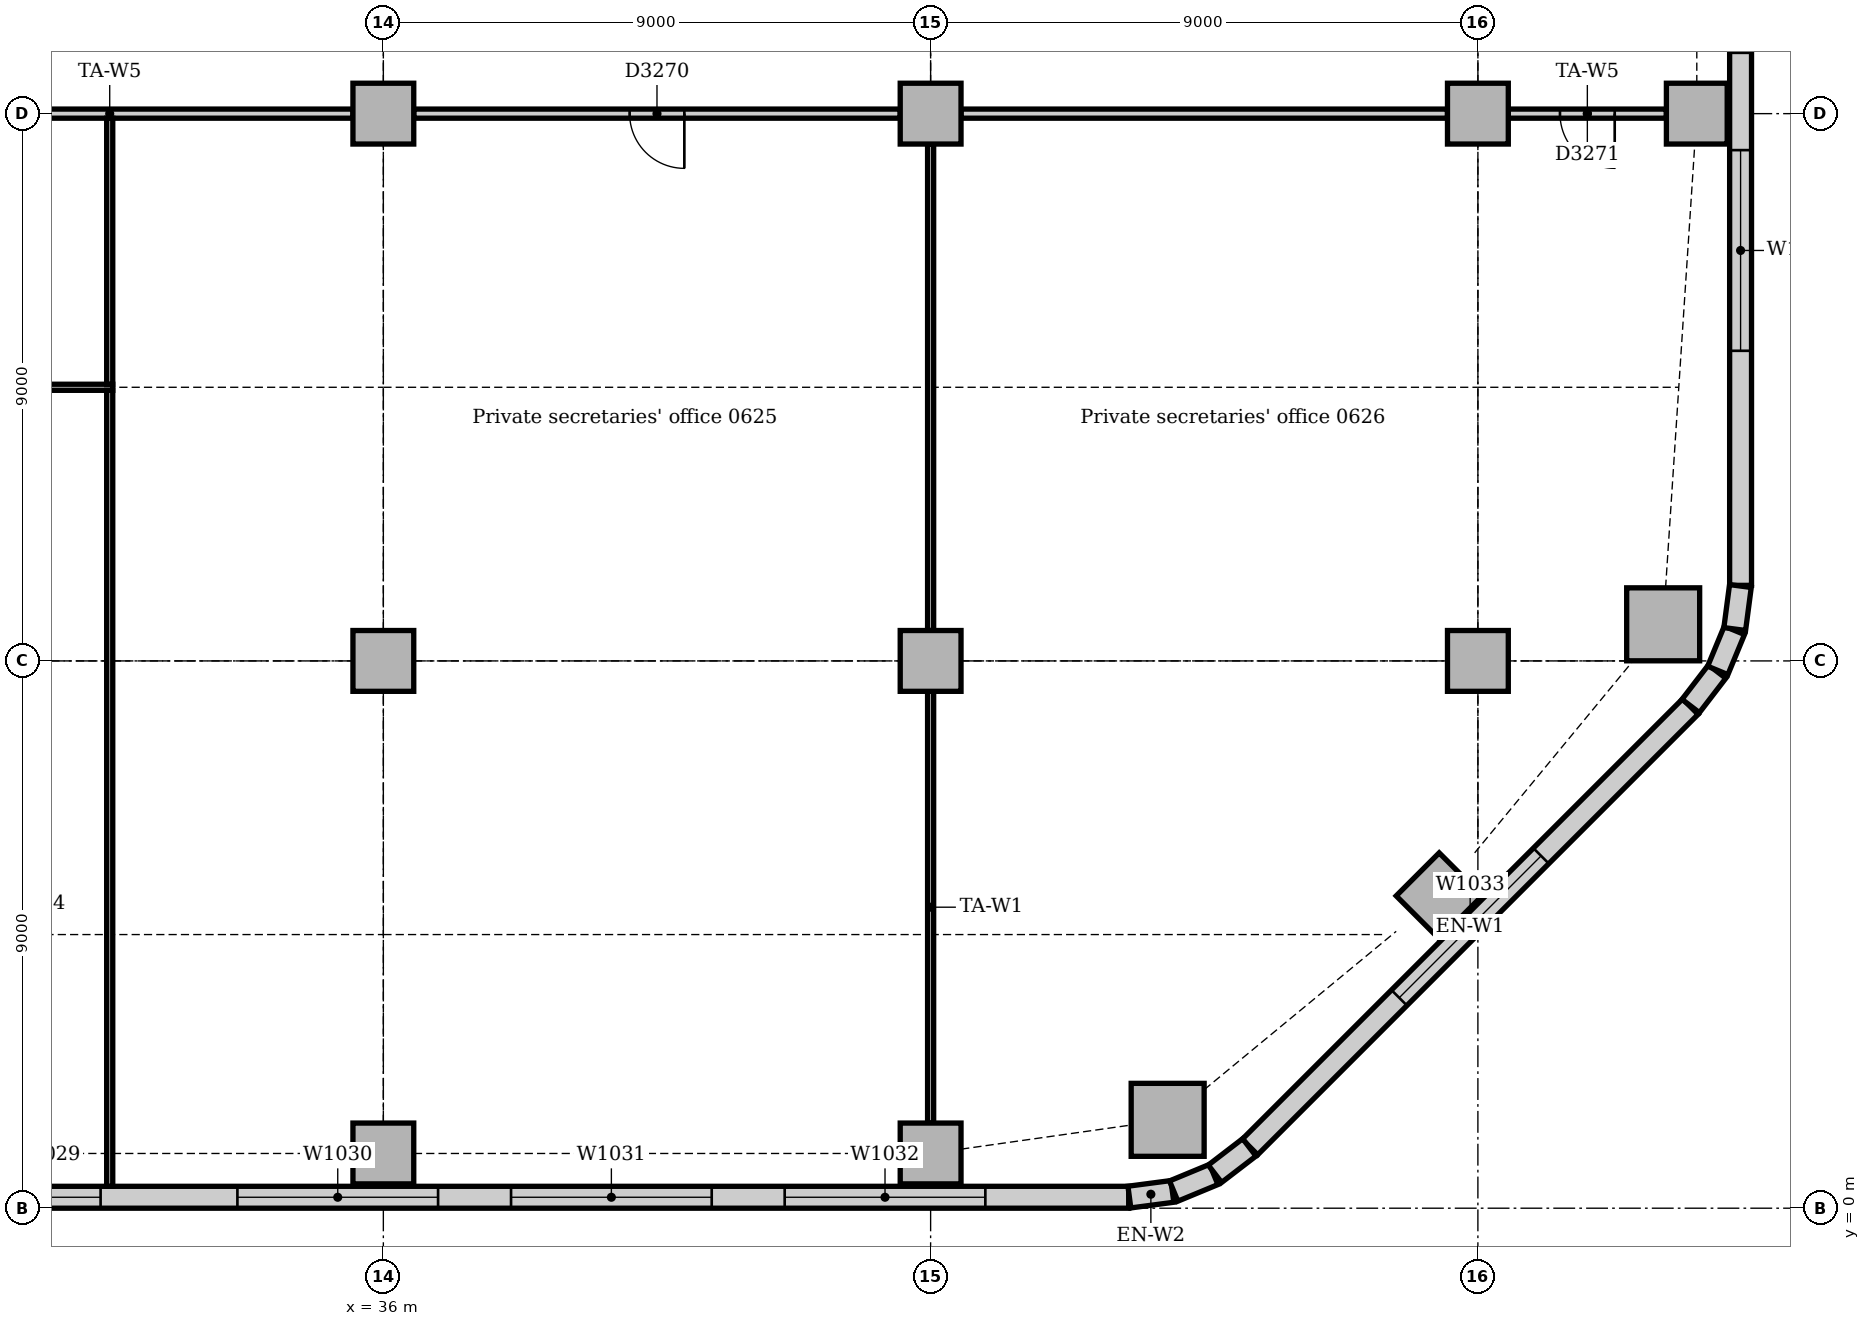
"""IFC4 building model, lengths in metres.
Left out: names, types, materials, properties, quantities, classifications, styles, units other than length and angle.
Written with IfcOpenShell. Run it as: python <this file> out.ifc"""

import sys

from ifc_helpers import new_model, si_unit, direction, frame, frame_2d, origin, origin_2d, place, context, subcontext, project, spatial, rectangle, extrude, element, fill, save


model = new_model("IFC4")
c1 = context("Model", 3, precision=1e-05, world=origin(), true_north=direction((0.0, 1.0)))
c2 = subcontext(c1, "Body", "Model", "MODEL_VIEW")
j1 = project(units=[si_unit("LENGTHUNIT", "METRE"), si_unit("PLANEANGLEUNIT", "RADIAN")], contexts=[c1])
p1 = place(None, origin())
s1 = spatial("IfcSite", under=j1, at=p1, CompositionType="ELEMENT")
p2 = place(p1, origin())
s2 = spatial("IfcBuilding", under=s1, at=p2, CompositionType="ELEMENT")
p3 = place(p2, frame((0.0, 0.0, 30.0)))
s3 = spatial("IfcBuildingStorey", under=s2, at=p3, CompositionType="ELEMENT", Elevation=30.0)
for number, where, z_axis, x_axis in (
    (1, (48.898, 1.453, 0.0), (0.0, 0.0, 1.0), (1.0, 0.0, 0.0)),
    (2, (57.047, 9.602, 0.0), (0.0, 0.0, 1.0), (1.0, 0.0, 0.0)),
):
    element("IfcColumn", number, at=place(p3, frame(where, z_axis=z_axis, x_axis=x_axis)), inside=s3, PredefinedType="COLUMN", context=c2, shape_type="SweptSolid", body=[
        extrude(rectangle(XDim=1.2, YDim=1.2, at=origin_2d()), origin(), (0.0, 0.0, 1.0), 3.85),
    ])
for number, where, z_axis, x_axis in (
    (3, (36.0, 0.9, 0.0), (0.0, 0.0, 1.0), (1.0, 0.0, 0.0)),
    (4, (45.0, 0.9, 0.0), (0.0, 0.0, 1.0), (1.0, 0.0, 0.0)),
    (5, (53.364, 5.136, 0.0), (0.0, 0.0, 1.0), (0.707, 0.707, 0.0)),
    (6, (57.6, 18.0, 0.0), (0.0, 0.0, 1.0), (1.0, 0.0, 0.0)),
    (7, (36.0, 9.0, 0.0), (0.0, 0.0, 1.0), (1.0, 0.0, 0.0)),
    (8, (36.0, 18.0, 0.0), (0.0, 0.0, 1.0), (1.0, 0.0, 0.0)),
    (9, (45.0, 9.0, 0.0), (0.0, 0.0, 1.0), (1.0, 0.0, 0.0)),
    (10, (45.0, 18.0, 0.0), (0.0, 0.0, 1.0), (1.0, 0.0, 0.0)),
    (11, (54.0, 9.0, 0.0), (0.0, 0.0, 1.0), (1.0, 0.0, 0.0)),
    (12, (54.0, 18.0, 0.0), (0.0, 0.0, 1.0), (1.0, 0.0, 0.0)),
):
    element("IfcColumn", number, at=place(p3, frame(where, z_axis=z_axis, x_axis=x_axis)), inside=s3, PredefinedType="COLUMN", context=c2, shape_type="SweptSolid", body=[
        extrude(rectangle(XDim=1.0, YDim=1.0, at=origin_2d()), origin(), (0.0, 0.0, 1.0), 3.85),
    ])
p4 = place(p3, frame((4.243, 0.18, 0.0), z_axis=(0.0, 0.0, 1.0), x_axis=(1.0, 0.0, 0.0)))
e13 = element("IfcWall", 13, at=p4, inside=s3, PredefinedType="STANDARD", context=c2, shape_type="SweptSolid", body=[
    extrude(rectangle(XDim=44.015, YDim=0.36, at=frame_2d((22.007, 0.0))), origin(), (0.0, 0.0, 1.0), 3.85),
])
p5 = place(p4, frame((2.707, 0.0, 0.9)))
e14 = element("IfcOpeningElement", 14, at=p5, cuts=e13, PredefinedType="OPENING", context=c2, shape_type="SweptSolid", body=[
    extrude(rectangle(XDim=3.3, YDim=1.6, at=frame_2d((1.65, 0.8))), frame((0.0, 0.19, 0.0), z_axis=(0.0, -1.0, 0.0), x_axis=(1.0, 0.0, 0.0)), (0.0, 0.0, 1.0), 0.38),
])
p6 = place(p4, frame((7.257, 0.0, 0.9)))
e15 = element("IfcOpeningElement", 15, at=p6, cuts=e13, PredefinedType="OPENING", context=c2, shape_type="SweptSolid", body=[
    extrude(rectangle(XDim=1.8, YDim=1.6, at=frame_2d((0.9, 0.8))), frame((0.0, 0.19, 0.0), z_axis=(0.0, -1.0, 0.0), x_axis=(1.0, 0.0, 0.0)), (0.0, 0.0, 1.0), 0.38),
])
p7 = place(p4, frame((11.357, 0.0, 0.9)))
e16 = element("IfcOpeningElement", 16, at=p7, cuts=e13, PredefinedType="OPENING", context=c2, shape_type="SweptSolid", body=[
    extrude(rectangle(XDim=3.3, YDim=1.6, at=frame_2d((1.65, 0.8))), frame((0.0, 0.19, 0.0), z_axis=(0.0, -1.0, 0.0), x_axis=(1.0, 0.0, 0.0)), (0.0, 0.0, 1.0), 0.38),
])
p8 = place(p4, frame((16.307, 0.0, 0.9)))
e17 = element("IfcOpeningElement", 17, at=p8, cuts=e13, PredefinedType="OPENING", context=c2, shape_type="SweptSolid", body=[
    extrude(rectangle(XDim=1.8, YDim=1.6, at=frame_2d((0.9, 0.8))), frame((0.0, 0.19, 0.0), z_axis=(0.0, -1.0, 0.0), x_axis=(1.0, 0.0, 0.0)), (0.0, 0.0, 1.0), 0.38),
])
p9 = place(p4, frame((20.357, 0.0, 0.9)))
e18 = element("IfcOpeningElement", 18, at=p9, cuts=e13, PredefinedType="OPENING", context=c2, shape_type="SweptSolid", body=[
    extrude(rectangle(XDim=3.3, YDim=1.6, at=frame_2d((1.65, 0.8))), frame((0.0, 0.19, 0.0), z_axis=(0.0, -1.0, 0.0), x_axis=(1.0, 0.0, 0.0)), (0.0, 0.0, 1.0), 0.38),
])
p10 = place(p4, frame((25.307, 0.0, 0.9)))
e19 = element("IfcOpeningElement", 19, at=p10, cuts=e13, PredefinedType="OPENING", context=c2, shape_type="SweptSolid", body=[
    extrude(rectangle(XDim=1.8, YDim=1.6, at=frame_2d((0.9, 0.8))), frame((0.0, 0.19, 0.0), z_axis=(0.0, -1.0, 0.0), x_axis=(1.0, 0.0, 0.0)), (0.0, 0.0, 1.0), 0.38),
])
p11 = place(p4, frame((29.357, 0.0, 0.9)))
e20 = element("IfcOpeningElement", 20, at=p11, cuts=e13, PredefinedType="OPENING", context=c2, shape_type="SweptSolid", body=[
    extrude(rectangle(XDim=3.3, YDim=1.6, at=frame_2d((1.65, 0.8))), frame((0.0, 0.19, 0.0), z_axis=(0.0, -1.0, 0.0), x_axis=(1.0, 0.0, 0.0)), (0.0, 0.0, 1.0), 0.38),
])
p12 = place(p4, frame((33.857, 0.0, 0.9)))
e21 = element("IfcOpeningElement", 21, at=p12, cuts=e13, PredefinedType="OPENING", context=c2, shape_type="SweptSolid", body=[
    extrude(rectangle(XDim=3.3, YDim=1.6, at=frame_2d((1.65, 0.8))), frame((0.0, 0.19, 0.0), z_axis=(0.0, -1.0, 0.0), x_axis=(1.0, 0.0, 0.0)), (0.0, 0.0, 1.0), 0.38),
])
p13 = place(p4, frame((38.357, 0.0, 0.9)))
e22 = element("IfcOpeningElement", 22, at=p13, cuts=e13, PredefinedType="OPENING", context=c2, shape_type="SweptSolid", body=[
    extrude(rectangle(XDim=3.3, YDim=1.6, at=frame_2d((1.65, 0.8))), frame((0.0, 0.19, 0.0), z_axis=(0.0, -1.0, 0.0), x_axis=(1.0, 0.0, 0.0)), (0.0, 0.0, 1.0), 0.38),
])
p14 = place(p3, frame((50.251, 1.006, 0.0), z_axis=(0.0, 0.0, 1.0), x_axis=(0.707106781187, 0.707106781187, 0.0)))
e23 = element("IfcWall", 23, at=p14, inside=s3, PredefinedType="STANDARD", context=c2, shape_type="SweptSolid", body=[
    extrude(rectangle(XDim=10.243, YDim=0.36, at=frame_2d((5.121, 0.0))), origin(), (0.0, 0.0, 1.0), 3.85),
])
p15 = place(p14, frame((3.471, 0.0, 0.9)))
e24 = element("IfcOpeningElement", 24, at=p15, cuts=e23, PredefinedType="OPENING", context=c2, shape_type="SweptSolid", body=[
    extrude(rectangle(XDim=3.3, YDim=1.6, at=frame_2d((1.65, 0.8))), frame((0.0, 0.19, 0.0), z_axis=(0.0, -1.0, 0.0), x_axis=(1.0, 0.0, 0.0)), (0.0, 0.0, 1.0), 0.38),
])
p16 = place(p3, frame((58.32, 10.243, 0.0), z_axis=(0.0, 0.0, 1.0), x_axis=(0.0, 1.0, 0.0)))
e25 = element("IfcWall", 25, at=p16, inside=s3, PredefinedType="STANDARD", context=c2, shape_type="SweptSolid", body=[
    extrude(rectangle(XDim=24.515, YDim=0.36, at=frame_2d((12.257, 0.0))), origin(), (0.0, 0.0, 1.0), 3.85),
])
p17 = place(p16, frame((3.857, 0.0, 0.9)))
e26 = element("IfcOpeningElement", 26, at=p17, cuts=e25, PredefinedType="OPENING", context=c2, shape_type="SweptSolid", body=[
    extrude(rectangle(XDim=3.3, YDim=1.6, at=frame_2d((1.65, 0.8))), frame((0.0, 0.19, 0.0), z_axis=(0.0, -1.0, 0.0), x_axis=(1.0, 0.0, 0.0)), (0.0, 0.0, 1.0), 0.38),
])
p18 = place(p16, frame((8.757, 0.0, 0.9)))
e27 = element("IfcOpeningElement", 27, at=p18, cuts=e25, PredefinedType="OPENING", context=c2, shape_type="SweptSolid", body=[
    extrude(rectangle(XDim=1.8, YDim=1.6, at=frame_2d((0.9, 0.8))), frame((0.0, 0.19, 0.0), z_axis=(0.0, -1.0, 0.0), x_axis=(1.0, 0.0, 0.0)), (0.0, 0.0, 1.0), 0.38),
])
p19 = place(p16, frame((12.557, 0.0, 0.9)))
e28 = element("IfcOpeningElement", 28, at=p19, cuts=e25, PredefinedType="OPENING", context=c2, shape_type="SweptSolid", body=[
    extrude(rectangle(XDim=3.3, YDim=1.6, at=frame_2d((1.65, 0.8))), frame((0.0, 0.19, 0.0), z_axis=(0.0, -1.0, 0.0), x_axis=(1.0, 0.0, 0.0)), (0.0, 0.0, 1.0), 0.38),
])
p20 = place(p16, frame((17.357, 0.0, 0.9)))
e29 = element("IfcOpeningElement", 29, at=p20, cuts=e25, PredefinedType="OPENING", context=c2, shape_type="SweptSolid", body=[
    extrude(rectangle(XDim=3.3, YDim=1.6, at=frame_2d((1.65, 0.8))), frame((0.0, 0.19, 0.0), z_axis=(0.0, -1.0, 0.0), x_axis=(1.0, 0.0, 0.0)), (0.0, 0.0, 1.0), 0.38),
])
for number, where, z_axis, x_axis in (
    (30, (48.269, 0.183, 0.0), (0.0, 0.0, 1.0), (0.991, 0.131, 0.0)),
    (31, (48.997, 0.282, 0.0), (0.0, 0.0, 1.0), (0.924, 0.383, 0.0)),
):
    element("IfcWall", number, at=place(p3, frame(where, z_axis=z_axis, x_axis=x_axis)), inside=s3, PredefinedType="STANDARD", context=c2, shape_type="SweptSolid", body=[
        extrude(rectangle(XDim=0.713, YDim=0.36, at=frame_2d((0.356, 0.0))), origin(), (0.0, 0.0, 1.0), 3.85),
    ])
for number, where, z_axis, x_axis in (
    (32, (49.675, 0.566, 0.0), (0.0, 0.0, 1.0), (0.793, 0.609, 0.0)),
    (33, (57.5, 8.259, 0.0), (0.0, 0.0, 1.0), (0.609, 0.793, 0.0)),
):
    element("IfcWall", number, at=place(p3, frame(where, z_axis=z_axis, x_axis=x_axis)), inside=s3, PredefinedType="STANDARD", context=c2, shape_type="SweptSolid", body=[
        extrude(rectangle(XDim=0.713, YDim=0.36, at=frame_2d((0.357, 0.0))), origin(), (0.0, 0.0, 1.0), 3.85),
    ])
for number, where, z_axis, x_axis in (
    (34, (57.945, 8.844, 0.0), (0.0, 0.0, 1.0), (0.383, 0.924, 0.0)),
    (35, (58.224, 9.524, 0.0), (0.0, 0.0, 1.0), (0.131, 0.991, 0.0)),
):
    element("IfcWall", number, at=place(p3, frame(where, z_axis=z_axis, x_axis=x_axis)), inside=s3, PredefinedType="STANDARD", context=c2, shape_type="SweptSolid", body=[
        extrude(rectangle(XDim=0.713, YDim=0.36, at=frame_2d((0.356, 0.0))), origin(), (0.0, 0.0, 1.0), 3.85),
    ])
p21 = place(p3, frame((54.5, 18.0, 0.0), z_axis=(0.0, 0.0, 1.0), x_axis=(1.0, 0.0, 0.0)))
e36 = element("IfcWall", 36, at=p21, inside=s3, PredefinedType="PARTITIONING", context=c2, shape_type="SweptSolid", body=[
    extrude(rectangle(XDim=2.6, YDim=0.15, at=frame_2d((1.3, 0.0))), origin(), (0.0, 0.0, 1.0), 3.602),
])
p22 = place(p21, frame((0.85, 0.0, 0.0)))
e37 = element("IfcOpeningElement", 37, at=p22, cuts=e36, PredefinedType="OPENING", context=c2, shape_type="SweptSolid", body=[
    extrude(rectangle(XDim=0.9, YDim=2.1, at=frame_2d((0.45, 1.05))), frame((0.0, 0.085, 0.0), z_axis=(0.0, -1.0, 0.0), x_axis=(1.0, 0.0, 0.0)), (0.0, 0.0, 1.0), 0.17),
])
p23 = place(p3, frame((45.5, 18.0, 0.0), z_axis=(0.0, 0.0, 1.0), x_axis=(1.0, 0.0, 0.0)))
e38 = element("IfcWall", 38, at=p23, inside=s3, PredefinedType="PARTITIONING", context=c2, shape_type="SweptSolid", body=[
    extrude(rectangle(XDim=8.0, YDim=0.15, at=frame_2d((4.0, 0.0))), origin(), (0.0, 0.0, 1.0), 3.15),
])
p24 = place(p3, frame((36.5, 18.0, 0.0), z_axis=(0.0, 0.0, 1.0), x_axis=(1.0, 0.0, 0.0)))
e39 = element("IfcWall", 39, at=p24, inside=s3, PredefinedType="PARTITIONING", context=c2, shape_type="SweptSolid", body=[
    extrude(rectangle(XDim=8.0, YDim=0.15, at=frame_2d((4.0, 0.0))), origin(), (0.0, 0.0, 1.0), 3.15),
])
p25 = place(p24, frame((3.55, 0.0, 0.0)))
e40 = element("IfcOpeningElement", 40, at=p25, cuts=e39, PredefinedType="OPENING", context=c2, shape_type="SweptSolid", body=[
    extrude(rectangle(XDim=0.9, YDim=2.1, at=frame_2d((0.45, 1.05))), frame((0.0, 0.085, 0.0), z_axis=(0.0, -1.0, 0.0), x_axis=(1.0, 0.0, 0.0)), (0.0, 0.0, 1.0), 0.17),
])
p26 = place(p3, frame((27.5, 18.0, 0.0), z_axis=(0.0, 0.0, 1.0), x_axis=(1.0, 0.0, 0.0)))
e41 = element("IfcWall", 41, at=p26, inside=s3, PredefinedType="PARTITIONING", context=c2, shape_type="SweptSolid", body=[
    extrude(rectangle(XDim=8.0, YDim=0.15, at=frame_2d((4.0, 0.0))), origin(), (0.0, 0.0, 1.0), 3.15),
])
p27 = place(p3, frame((13.575, 13.5, 0.0), z_axis=(0.0, 0.0, 1.0), x_axis=(1.0, 0.0, 0.0)))
e42 = element("IfcWall", 42, at=p27, inside=s3, PredefinedType="PARTITIONING", context=c2, shape_type="SweptSolid", body=[
    extrude(rectangle(XDim=17.975, YDim=0.1, at=frame_2d((8.988, 0.0))), origin(), (0.0, 0.0, 1.0), 3.35),
])
p28 = place(p27, frame((4.1, 0.0, 0.0)))
e43 = element("IfcOpeningElement", 43, at=p28, cuts=e42, PredefinedType="OPENING", context=c2, shape_type="SweptSolid", body=[
    extrude(rectangle(XDim=0.9, YDim=2.1, at=frame_2d((0.45, 1.05))), frame((0.0, 0.06, 0.0), z_axis=(0.0, -1.0, 0.0), x_axis=(1.0, 0.0, 0.0)), (0.0, 0.0, 1.0), 0.12),
])
p29 = place(p27, frame((12.925, 0.0, 0.0)))
e44 = element("IfcOpeningElement", 44, at=p29, cuts=e42, PredefinedType="OPENING", context=c2, shape_type="SweptSolid", body=[
    extrude(rectangle(XDim=0.9, YDim=2.1, at=frame_2d((0.45, 1.05))), frame((0.0, 0.06, 0.0), z_axis=(0.0, -1.0, 0.0), x_axis=(1.0, 0.0, 0.0)), (0.0, 0.0, 1.0), 0.12),
])
p30 = place(p3, frame((31.5, 13.55, 0.0), z_axis=(0.0, 0.0, 1.0), x_axis=(0.0, 1.0, 0.0)))
e45 = element("IfcWall", 45, at=p30, inside=s3, PredefinedType="PARTITIONING", context=c2, shape_type="SweptSolid", body=[
    extrude(rectangle(XDim=4.375, YDim=0.1, at=frame_2d((2.188, 0.0))), origin(), (0.0, 0.0, 1.0), 3.85),
])
p31 = place(p3, frame((31.5, 0.36, 0.0), z_axis=(0.0, 0.0, 1.0), x_axis=(0.0, 1.0, 0.0)))
e46 = element("IfcWall", 46, at=p31, inside=s3, PredefinedType="PARTITIONING", context=c2, shape_type="SweptSolid", body=[
    extrude(rectangle(XDim=13.09, YDim=0.1, at=frame_2d((6.545, 0.0))), origin(), (0.0, 0.0, 1.0), 3.85),
])
p32 = place(p3, frame((45.0, 1.4, 0.0), z_axis=(0.0, 0.0, 1.0), x_axis=(0.0, 1.0, 0.0)))
e47 = element("IfcWall", 47, at=p32, inside=s3, PredefinedType="PARTITIONING", context=c2, shape_type="SweptSolid", body=[
    extrude(rectangle(XDim=7.1, YDim=0.1, at=frame_2d((3.55, 0.0))), origin(), (0.0, 0.0, 1.0), 3.158),
])
p33 = place(p3, frame((45.0, 9.5, 0.0), z_axis=(0.0, 0.0, 1.0), x_axis=(0.0, 1.0, 0.0)))
e48 = element("IfcWall", 48, at=p33, inside=s3, PredefinedType="PARTITIONING", context=c2, shape_type="SweptSolid", body=[
    extrude(rectangle(XDim=8.0, YDim=0.1, at=frame_2d((4.0, 0.0))), origin(), (0.0, 0.0, 1.0), 3.158),
])
p34 = place(p10, origin())
e49 = element("IfcWindow", 49, at=p34, inside=s3, PartitioningType="SINGLE_PANEL", PredefinedType="WINDOW", context=c2, shape_type="SweptSolid", body=[
    extrude(rectangle(XDim=1.8, YDim=1.6, at=frame_2d((0.9, 0.8))), frame((0.0, 0.13, 0.0), z_axis=(0.0, -1.0, 0.0), x_axis=(1.0, 0.0, 0.0)), (0.0, 0.0, 1.0), 0.06),
])
fill(e19, e49)
p35 = place(p11, origin())
e50 = element("IfcWindow", 50, at=p35, inside=s3, PartitioningType="SINGLE_PANEL", PredefinedType="WINDOW", context=c2, shape_type="SweptSolid", body=[
    extrude(rectangle(XDim=3.3, YDim=1.6, at=frame_2d((1.65, 0.8))), frame((0.0, 0.13, 0.0), z_axis=(0.0, -1.0, 0.0), x_axis=(1.0, 0.0, 0.0)), (0.0, 0.0, 1.0), 0.06),
])
fill(e20, e50)
p36 = place(p12, origin())
e51 = element("IfcWindow", 51, at=p36, inside=s3, PartitioningType="SINGLE_PANEL", PredefinedType="WINDOW", context=c2, shape_type="SweptSolid", body=[
    extrude(rectangle(XDim=3.3, YDim=1.6, at=frame_2d((1.65, 0.8))), frame((0.0, 0.13, 0.0), z_axis=(0.0, -1.0, 0.0), x_axis=(1.0, 0.0, 0.0)), (0.0, 0.0, 1.0), 0.06),
])
fill(e21, e51)
p37 = place(p13, origin())
e52 = element("IfcWindow", 52, at=p37, inside=s3, PartitioningType="SINGLE_PANEL", PredefinedType="WINDOW", context=c2, shape_type="SweptSolid", body=[
    extrude(rectangle(XDim=3.3, YDim=1.6, at=frame_2d((1.65, 0.8))), frame((0.0, 0.13, 0.0), z_axis=(0.0, -1.0, 0.0), x_axis=(1.0, 0.0, 0.0)), (0.0, 0.0, 1.0), 0.06),
])
fill(e22, e52)
p38 = place(p15, origin())
e53 = element("IfcWindow", 53, at=p38, inside=s3, PartitioningType="SINGLE_PANEL", PredefinedType="WINDOW", context=c2, shape_type="SweptSolid", body=[
    extrude(rectangle(XDim=3.3, YDim=1.6, at=frame_2d((1.65, 0.8))), frame((0.0, 0.13, 0.0), z_axis=(0.0, -1.0, 0.0), x_axis=(1.0, 0.0, 0.0)), (0.0, 0.0, 1.0), 0.06),
])
fill(e24, e53)
p39 = place(p17, origin())
e54 = element("IfcWindow", 54, at=p39, inside=s3, PartitioningType="SINGLE_PANEL", PredefinedType="WINDOW", context=c2, shape_type="SweptSolid", body=[
    extrude(rectangle(XDim=3.3, YDim=1.6, at=frame_2d((1.65, 0.8))), frame((0.0, 0.13, 0.0), z_axis=(0.0, -1.0, 0.0), x_axis=(1.0, 0.0, 0.0)), (0.0, 0.0, 1.0), 0.06),
])
fill(e26, e54)
p40 = place(p25, frame((0.9, 0.0, 0.0), z_axis=(0.0, 0.0, 1.0), x_axis=(-1.0, 0.0, 0.0)))
e55 = element("IfcDoor", 55, at=p40, inside=s3, OperationType="SINGLE_SWING_LEFT", PredefinedType="DOOR", context=c2, shape_type="SweptSolid", body=[
    extrude(rectangle(XDim=0.9, YDim=2.1, at=frame_2d((0.45, 1.05))), frame((0.0, 0.025, 0.0), z_axis=(0.0, -1.0, 0.0), x_axis=(1.0, 0.0, 0.0)), (0.0, 0.0, 1.0), 0.05),
])
fill(e40, e55)
p41 = place(p22, frame((0.9, 0.0, 0.0), z_axis=(0.0, 0.0, 1.0), x_axis=(-1.0, 0.0, 0.0)))
e56 = element("IfcDoor", 56, at=p41, inside=s3, OperationType="SINGLE_SWING_LEFT", PredefinedType="DOOR", context=c2, shape_type="SweptSolid", body=[
    extrude(rectangle(XDim=0.9, YDim=2.1, at=frame_2d((0.45, 1.05))), frame((0.0, 0.025, 0.0), z_axis=(0.0, -1.0, 0.0), x_axis=(1.0, 0.0, 0.0)), (0.0, 0.0, 1.0), 0.05),
])
fill(e37, e56)
save(model, sys.argv[1])
